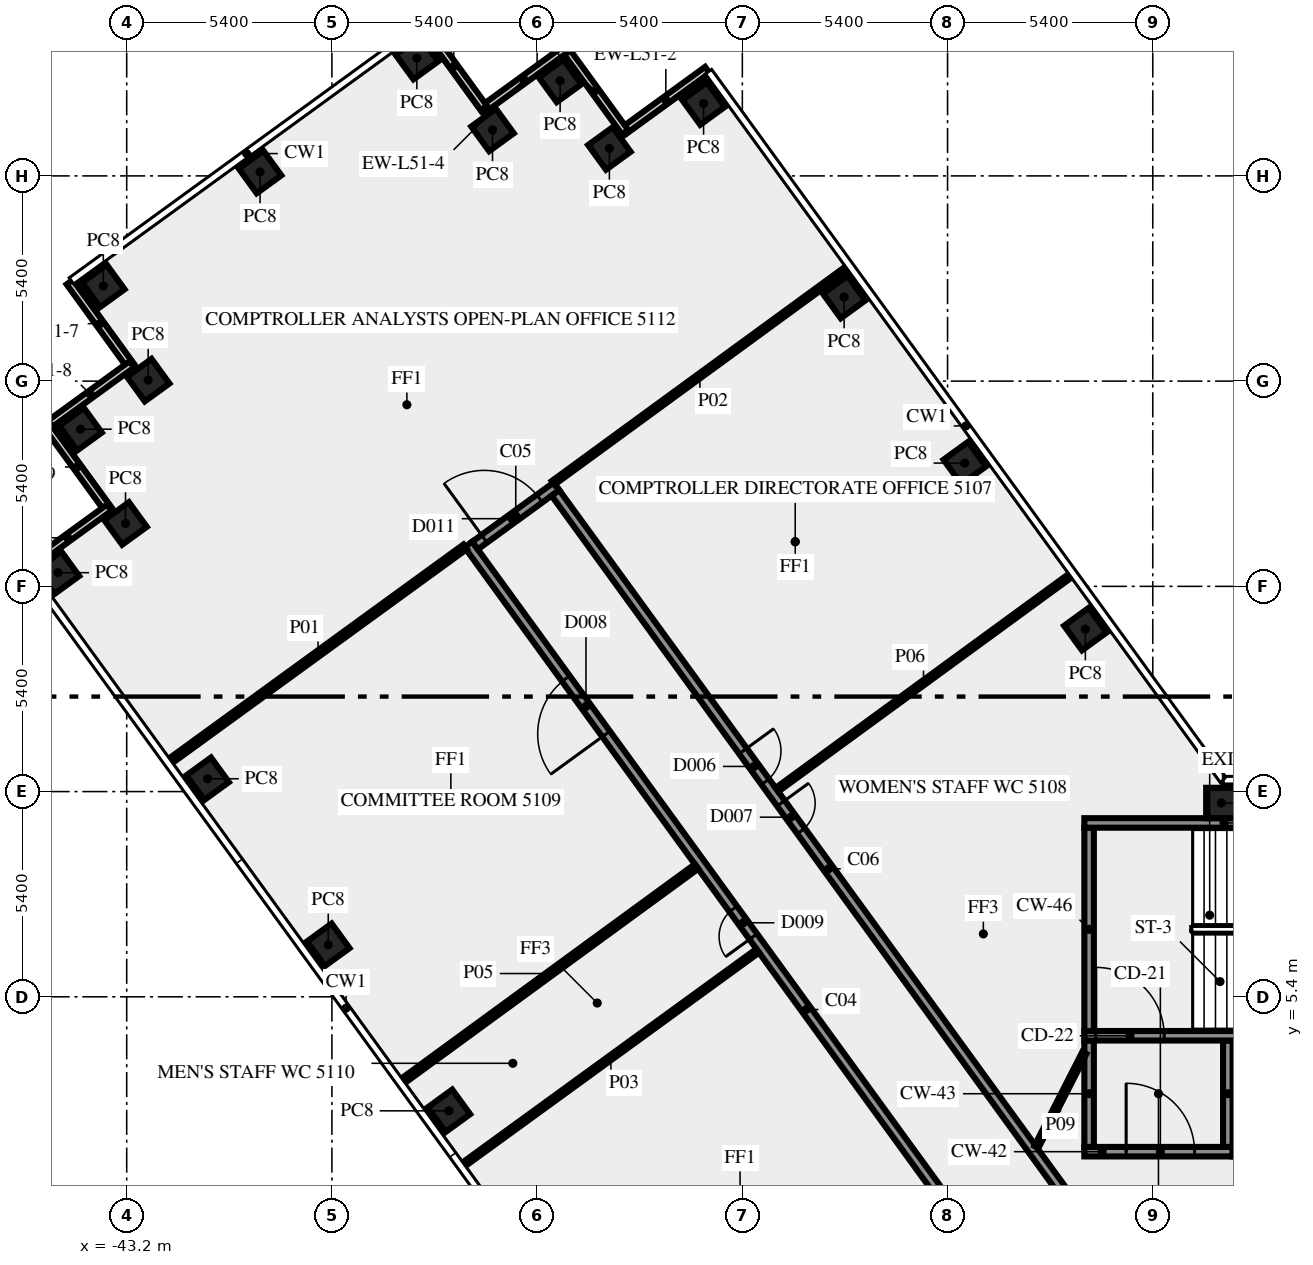
"""IFC4 building model, lengths in metres.
Left out: names, types, materials, properties, quantities, classifications, styles, units other than length and angle.
Written with IfcOpenShell. Run it as: python <this file> out.ifc"""

import sys

from ifc_helpers import new_model, si_unit, direction, frame, frame_2d, origin, origin_2d, place, context, subcontext, project, spatial, rectangle, extrude, element, fill, save


model = new_model("IFC4")
c1 = context("Model", 3, precision=1e-05, world=origin(), true_north=direction((0.0, 1.0)))
c2 = subcontext(c1, "Body", "Model", "MODEL_VIEW")
j1 = project(units=[si_unit("LENGTHUNIT", "METRE"), si_unit("PLANEANGLEUNIT", "RADIAN")], contexts=[c1])
p1 = place(None, origin())
s1 = spatial("IfcSite", under=j1, at=p1, CompositionType="ELEMENT")
p2 = place(p1, origin())
s2 = spatial("IfcBuilding", under=s1, at=p2, CompositionType="ELEMENT")
p3 = place(p2, frame((0.0, 0.0, 218.0)))
s3 = spatial("IfcBuildingStorey", under=s2, at=p3, CompositionType="ELEMENT", Elevation=218.0)
for number, where, z_axis, x_axis in (
    (1, (-17.974, 15.075, 0.0), (0.0, 0.0, 1.0), (-0.588, 0.809, 0.0)),
    (2, (-21.147, 19.444, 0.0), (0.0, 0.0, 1.0), (-0.588, 0.809, 0.0)),
    (3, (-24.321, 23.812, 0.0), (0.0, 0.0, 1.0), (-0.588, 0.809, 0.0)),
    (4, (-28.02, 28.905, 0.0), (0.0, 0.0, 1.0), (-0.809, -0.588, 0.0)),
    (5, (-30.499, 27.723, 0.0), (0.0, 0.0, 1.0), (-0.809, -0.588, 0.0)),
    (6, (-31.795, 29.5, 0.0), (0.0, 0.0, 1.0), (-0.588, 0.809, 0.0)),
    (7, (-33.574, 28.209, 0.0), (0.0, 0.0, 1.0), (-0.588, 0.809, 0.0)),
    (8, (-35.565, 30.1, 0.0), (0.0, 0.0, 1.0), (-0.809, -0.588, 0.0)),
    (9, (-39.691, 27.102, 0.0), (0.0, 0.0, 1.0), (-0.809, -0.588, 0.0)),
    (10, (-43.815, 24.105, 0.0), (0.0, 0.0, 1.0), (-0.809, -0.588, 0.0)),
    (11, (-42.635, 21.626, 0.0), (0.0, 0.0, 1.0), (-0.809, -0.588, 0.0)),
    (12, (-44.415, 20.335, 0.0), (0.0, 0.0, 1.0), (0.588, -0.809, 0.0)),
    (13, (-43.231, 17.854, 0.0), (0.0, 0.0, 1.0), (0.588, -0.809, 0.0)),
    (14, (-45.01, 16.56, 0.0), (0.0, 0.0, 1.0), (0.588, -0.809, 0.0)),
    (15, (-41.07, 11.137, 0.0), (0.0, 0.0, 1.0), (0.588, -0.809, 0.0)),
    (16, (-37.896, 6.769, 0.0), (0.0, 0.0, 1.0), (0.588, -0.809, 0.0)),
    (17, (-34.722, 2.4, 0.0), (0.0, 0.0, 1.0), (0.588, -0.809, 0.0)),
    (18, (-14.395, 10.5, 0.0), (0.0, 0.0, 1.0), (-1.0, 0.0, 0.0)),
):
    element("IfcColumn", number, at=place(p3, frame(where, z_axis=z_axis, x_axis=x_axis)), inside=s3, PredefinedType="COLUMN", context=c2, shape_type="SweptSolid", body=[
        extrude(rectangle(XDim=0.8, YDim=0.8, at=origin_2d()), origin(), (0.0, 0.0, 1.0), 3.65),
    ])
for number, where, z_axis, x_axis in (
    (19, (-27.921, 29.787, 0.0), (0.0, 0.0, 1.0), (-0.809, -0.588, 0.0)),
    (20, (-30.083, 28.149, 0.0), (0.0, 0.0, 1.0), (-0.588, 0.809, 0.0)),
    (21, (-31.654, 30.331, 0.0), (0.0, 0.0, 1.0), (-0.809, -0.588, 0.0)),
    (22, (-33.801, 28.786, 0.0), (0.0, 0.0, 1.0), (-0.588, 0.809, 0.0)),
    (23, (-44.699, 24.205, 0.0), (0.0, 0.0, 1.0), (0.588, -0.809, 0.0)),
    (24, (-43.061, 22.043, 0.0), (0.0, 0.0, 1.0), (-0.809, -0.588, 0.0)),
    (25, (-45.296, 20.434, 0.0), (0.0, 0.0, 1.0), (0.588, -0.809, 0.0)),
    (26, (-43.658, 18.272, 0.0), (0.0, 0.0, 1.0), (-0.809, -0.588, 0.0)),
):
    element("IfcWall", number, at=place(p3, frame(where, z_axis=z_axis, x_axis=x_axis)), inside=s3, PredefinedType="SOLIDWALL", context=c2, shape_type="SweptSolid", body=[
        extrude(rectangle(XDim=2.7, YDim=0.2, at=frame_2d((1.35, 0.0))), origin(), (0.0, 0.0, 1.0), 3.65),
    ])
p4 = place(p3, frame((-18.0, 1.325, 0.0), z_axis=(0.0, 0.0, 1.0), x_axis=(1.0, 0.0, 0.0)))
e27 = element("IfcWall", 27, at=p4, inside=s3, PredefinedType="SHEAR", context=c2, shape_type="SweptSolid", body=[
    extrude(rectangle(XDim=3.9, YDim=0.25, at=frame_2d((1.95, 0.0))), origin(), (0.0, 0.0, 1.0), 3.65),
])
p5 = place(p4, frame((1.1, 0.0, 0.0)))
e28 = element("IfcOpeningElement", 28, at=p5, cuts=e27, PredefinedType="OPENING", context=c2, shape_type="SweptSolid", body=[
    extrude(rectangle(XDim=1.8, YDim=2.1, at=frame_2d((0.9, 1.05))), frame((0.0, 0.135, 0.0), z_axis=(0.0, -1.0, 0.0), x_axis=(1.0, 0.0, 0.0)), (0.0, 0.0, 1.0), 0.27),
])
for number, where, z_axis, x_axis in (
    (29, (-17.875, 1.45, 0.0), (0.0, 0.0, 1.0), (0.0, 1.0, 0.0)),
    (30, (-14.225, 1.45, 0.0), (0.0, 0.0, 1.0), (0.0, 1.0, 0.0)),
):
    element("IfcWall", number, at=place(p3, frame(where, z_axis=z_axis, x_axis=x_axis)), inside=s3, PredefinedType="SHEAR", context=c2, shape_type="SweptSolid", body=[
        extrude(rectangle(XDim=2.8, YDim=0.25, at=frame_2d((1.4, 0.0))), origin(), (0.0, 0.0, 1.0), 3.65),
    ])
p6 = place(p3, frame((-18.0, 4.375, 0.0), z_axis=(0.0, 0.0, 1.0), x_axis=(1.0, 0.0, 0.0)))
e31 = element("IfcWall", 31, at=p6, inside=s3, PredefinedType="SHEAR", context=c2, shape_type="SweptSolid", body=[
    extrude(rectangle(XDim=10.5, YDim=0.25, at=frame_2d((5.25, 0.0))), origin(), (0.0, 0.0, 1.0), 3.65),
])
p7 = place(p6, frame((0.3, 0.0, 0.0)))
e32 = element("IfcOpeningElement", 32, at=p7, cuts=e31, PredefinedType="OPENING", context=c2, shape_type="SweptSolid", body=[
    extrude(rectangle(XDim=1.8, YDim=2.1, at=frame_2d((0.9, 1.05))), frame((0.0, 0.135, 0.0), z_axis=(0.0, -1.0, 0.0), x_axis=(1.0, 0.0, 0.0)), (0.0, 0.0, 1.0), 0.27),
])
p8 = place(p3, frame((-17.875, 4.5, 0.0), z_axis=(0.0, 0.0, 1.0), x_axis=(0.0, 1.0, 0.0)))
e33 = element("IfcWall", 33, at=p8, inside=s3, PredefinedType="SHEAR", context=c2, shape_type="SweptSolid", body=[
    extrude(rectangle(XDim=5.35, YDim=0.25, at=frame_2d((2.675, 0.0))), origin(), (0.0, 0.0, 1.0), 3.65),
])
p9 = place(p3, frame((-18.0, 9.975, 0.0), z_axis=(0.0, 0.0, 1.0), x_axis=(1.0, 0.0, 0.0)))
e34 = element("IfcWall", 34, at=p9, inside=s3, PredefinedType="SHEAR", context=c2, shape_type="SweptSolid", body=[
    extrude(rectangle(XDim=10.5, YDim=0.25, at=frame_2d((5.25, 0.0))), origin(), (0.0, 0.0, 1.0), 3.65),
])
p10 = place(p9, frame((4.5, 0.0, 1.0)))
e35 = element("IfcOpeningElement", 35, at=p10, cuts=e34, PredefinedType="OPENING", context=c2, shape_type="SweptSolid", body=[
    extrude(rectangle(XDim=1.2, YDim=1.2, at=frame_2d((0.6, 0.6))), frame((0.0, 0.135, 0.0), z_axis=(0.0, -1.0, 0.0), x_axis=(1.0, 0.0, 0.0)), (0.0, 0.0, 1.0), 0.27),
])
p11 = place(p3, frame((-20.531, -1.523, 0.0), z_axis=(0.0, 0.0, 1.0), x_axis=(-0.587784239999, 0.809017729849, 0.0)))
e36 = element("IfcWall", 36, at=p11, inside=s3, PredefinedType="SOLIDWALL", context=c2, shape_type="SweptSolid", body=[
    extrude(rectangle(XDim=23.271, YDim=0.25, at=frame_2d((11.635, 0.0))), origin(), (0.0, 0.0, 1.0), 3.65),
])
p12 = place(p11, frame((0.533, 0.0, 0.0)))
e37 = element("IfcOpeningElement", 37, at=p12, cuts=e36, PredefinedType="OPENING", context=c2, shape_type="SweptSolid", body=[
    extrude(rectangle(XDim=0.9, YDim=2.1, at=frame_2d((0.45, 1.05))), frame((0.0, 0.135, 0.0), z_axis=(0.0, -1.0, 0.0), x_axis=(1.0, 0.0, 0.0)), (0.0, 0.0, 1.0), 0.27),
])
p13 = place(p11, frame((17.106, 0.0, 0.0)))
e38 = element("IfcOpeningElement", 38, at=p13, cuts=e36, PredefinedType="OPENING", context=c2, shape_type="SweptSolid", body=[
    extrude(rectangle(XDim=1.8, YDim=2.1, at=frame_2d((0.9, 1.05))), frame((0.0, 0.135, 0.0), z_axis=(0.0, -1.0, 0.0), x_axis=(1.0, 0.0, 0.0)), (0.0, 0.0, 1.0), 0.27),
])
p14 = place(p11, frame((10.516, 0.0, 0.0)))
e39 = element("IfcOpeningElement", 39, at=p14, cuts=e36, PredefinedType="OPENING", context=c2, shape_type="SweptSolid", body=[
    extrude(rectangle(XDim=0.9, YDim=2.1, at=frame_2d((0.45, 1.05))), frame((0.0, 0.135, 0.0), z_axis=(0.0, -1.0, 0.0), x_axis=(1.0, 0.0, 0.0)), (0.0, 0.0, 1.0), 0.27),
])
p15 = place(p3, frame((-34.034, 17.275, 0.0), z_axis=(0.0, 0.0, 1.0), x_axis=(0.809006914995, 0.587799125119, 0.0)))
e40 = element("IfcWall", 40, at=p15, inside=s3, PredefinedType="SOLIDWALL", context=c2, shape_type="SweptSolid", body=[
    extrude(rectangle(XDim=2.65, YDim=0.25, at=frame_2d((1.325, 0.0))), origin(), (0.0, 0.0, 1.0), 3.65),
])
p16 = place(p15, frame((0.3, 0.0, 0.0)))
e41 = element("IfcOpeningElement", 41, at=p16, cuts=e40, PredefinedType="OPENING", context=c2, shape_type="SweptSolid", body=[
    extrude(rectangle(XDim=1.8, YDim=2.1, at=frame_2d((0.9, 1.05))), frame((0.0, 0.135, 0.0), z_axis=(0.0, -1.0, 0.0), x_axis=(1.0, 0.0, 0.0)), (0.0, 0.0, 1.0), 0.27),
])
p17 = place(p3, frame((-31.918, 18.658, 0.0), z_axis=(0.0, 0.0, 1.0), x_axis=(0.587788731405, -0.80901446664, 0.0)))
e42 = element("IfcWall", 42, at=p17, inside=s3, PredefinedType="SOLIDWALL", context=c2, shape_type="SweptSolid", body=[
    extrude(rectangle(XDim=24.453, YDim=0.25, at=frame_2d((12.227, 0.0))), origin(), (0.0, 0.0, 1.0), 3.65),
])
p18 = place(p17, frame((8.395, 0.0, 0.0)))
e43 = element("IfcOpeningElement", 43, at=p18, cuts=e42, PredefinedType="OPENING", context=c2, shape_type="SweptSolid", body=[
    extrude(rectangle(XDim=1.0, YDim=2.1, at=frame_2d((0.5, 1.05))), frame((0.0, 0.135, 0.0), z_axis=(0.0, -1.0, 0.0), x_axis=(1.0, 0.0, 0.0)), (0.0, 0.0, 1.0), 0.27),
])
p19 = place(p17, frame((10.095, 0.0, 0.0)))
e44 = element("IfcOpeningElement", 44, at=p19, cuts=e42, PredefinedType="OPENING", context=c2, shape_type="SweptSolid", body=[
    extrude(rectangle(XDim=0.9, YDim=2.1, at=frame_2d((0.45, 1.05))), frame((0.0, 0.135, 0.0), z_axis=(0.0, -1.0, 0.0), x_axis=(1.0, 0.0, 0.0)), (0.0, 0.0, 1.0), 0.27),
])
p20 = place(p3, frame((-42.036, 11.615, 0.0), z_axis=(0.0, 0.0, 1.0), x_axis=(0.808985331811, 0.587828829605, 0.0)))
e45 = element("IfcWall", 45, at=p20, inside=s3, PredefinedType="PARTITIONING", context=c2, shape_type="SweptSolid", body=[
    extrude(rectangle(XDim=9.57, YDim=0.15, at=frame_2d((4.785, 0.0))), origin(), (0.0, 0.0, 1.0), 2.85),
])
p21 = place(p3, frame((-31.98, 18.922, 0.0), z_axis=(0.0, 0.0, 1.0), x_axis=(0.807588329082, 0.589746632657, 0.0)))
e46 = element("IfcWall", 46, at=p21, inside=s3, PredefinedType="PARTITIONING", context=c2, shape_type="SweptSolid", body=[
    extrude(rectangle(XDim=9.57, YDim=0.12, at=frame_2d((4.785, 0.0))), origin(), (0.0, 0.0, 1.0), 2.85),
])
p22 = place(p3, frame((-26.595, 6.611, 0.0), z_axis=(0.0, 0.0, 1.0), x_axis=(-0.80900684162, -0.587799226107, 0.0)))
e47 = element("IfcWall", 47, at=p22, inside=s3, PredefinedType="PARTITIONING", context=c2, shape_type="SweptSolid", body=[
    extrude(rectangle(XDim=9.55, YDim=0.12, at=frame_2d((4.775, 0.0))), origin(), (0.0, 0.0, 1.0), 2.85),
])
p23 = place(p3, frame((-35.919, 3.197, 0.0), z_axis=(0.0, 0.0, 1.0), x_axis=(0.807645841498, 0.589667868135, 0.0)))
e48 = element("IfcWall", 48, at=p23, inside=s3, PredefinedType="PARTITIONING", context=c2, shape_type="SweptSolid", body=[
    extrude(rectangle(XDim=9.551, YDim=0.15, at=frame_2d((4.775, 0.0))), origin(), (0.0, 0.0, 1.0), 2.85),
])
p24 = place(p3, frame((-26.089, 10.848, 0.0), z_axis=(0.0, 0.0, 1.0), x_axis=(0.807661302092, 0.589646691759, 0.0)))
e49 = element("IfcWall", 49, at=p24, inside=s3, PredefinedType="PARTITIONING", context=c2, shape_type="SweptSolid", body=[
    extrude(rectangle(XDim=9.55, YDim=0.12, at=frame_2d((4.775, 0.0))), origin(), (0.0, 0.0, 1.0), 2.85),
])
p25 = place(p3, frame((-19.261, 1.45, 0.0), z_axis=(0.0, 0.0, 1.0), x_axis=(0.453950796792, 0.891026752736, 0.0)))
e50 = element("IfcWall", 50, at=p25, inside=s3, PredefinedType="PARTITIONING", context=c2, shape_type="SweptSolid", body=[
    extrude(rectangle(XDim=2.778, YDim=0.12, at=frame_2d((1.389, 0.0))), origin(), (0.0, 0.0, 1.0), 3.65),
])
p26 = place(p5, origin())
e51 = element("IfcDoor", 51, at=p26, inside=s3, OperationType="DOUBLE_DOOR_SINGLE_SWING", PredefinedType="DOOR", context=c2, shape_type="SweptSolid", body=[
    extrude(rectangle(XDim=1.8, YDim=2.1, at=frame_2d((0.9, 1.05))), frame((0.0, 0.025, 0.0), z_axis=(0.0, -1.0, 0.0), x_axis=(1.0, 0.0, 0.0)), (0.0, 0.0, 1.0), 0.05),
])
fill(e28, e51)
p27 = place(p7, origin())
e52 = element("IfcDoor", 52, at=p27, inside=s3, OperationType="DOUBLE_DOOR_SINGLE_SWING", PredefinedType="DOOR", context=c2, shape_type="SweptSolid", body=[
    extrude(rectangle(XDim=1.8, YDim=2.1, at=frame_2d((0.9, 1.05))), frame((0.0, 0.025, 0.0), z_axis=(0.0, -1.0, 0.0), x_axis=(1.0, 0.0, 0.0)), (0.0, 0.0, 1.0), 0.05),
])
fill(e32, e52)
p28 = place(p16, origin())
e53 = element("IfcDoor", 53, at=p28, inside=s3, OperationType="DOUBLE_DOOR_SINGLE_SWING", PredefinedType="DOOR", context=c2, shape_type="SweptSolid", body=[
    extrude(rectangle(XDim=1.8, YDim=2.1, at=frame_2d((0.9, 1.05))), frame((0.0, 0.025, 0.0), z_axis=(0.0, -1.0, 0.0), x_axis=(1.0, 0.0, 0.0)), (0.0, 0.0, 1.0), 0.05),
])
fill(e41, e53)
p29 = place(p13, origin())
e54 = element("IfcDoor", 54, at=p29, inside=s3, OperationType="DOUBLE_DOOR_SINGLE_SWING", PredefinedType="DOOR", context=c2, shape_type="SweptSolid", body=[
    extrude(rectangle(XDim=1.8, YDim=2.1, at=frame_2d((0.9, 1.05))), frame((0.0, 0.025, 0.0), z_axis=(0.0, -1.0, 0.0), x_axis=(1.0, 0.0, 0.0)), (0.0, 0.0, 1.0), 0.05),
])
fill(e38, e54)
p30 = place(p18, origin())
e55 = element("IfcDoor", 55, at=p30, inside=s3, OperationType="SINGLE_SWING_RIGHT", PredefinedType="DOOR", context=c2, shape_type="SweptSolid", body=[
    extrude(rectangle(XDim=1.0, YDim=2.1, at=frame_2d((0.5, 1.05))), frame((0.0, 0.025, 0.0), z_axis=(0.0, -1.0, 0.0), x_axis=(1.0, 0.0, 0.0)), (0.0, 0.0, 1.0), 0.05),
])
fill(e43, e55)
p31 = place(p19, origin())
e56 = element("IfcDoor", 56, at=p31, inside=s3, OperationType="SINGLE_SWING_LEFT", PredefinedType="DOOR", context=c2, shape_type="SweptSolid", body=[
    extrude(rectangle(XDim=0.9, YDim=2.1, at=frame_2d((0.45, 1.05))), frame((0.0, 0.025, 0.0), z_axis=(0.0, -1.0, 0.0), x_axis=(1.0, 0.0, 0.0)), (0.0, 0.0, 1.0), 0.05),
])
fill(e44, e56)
p32 = place(p14, origin())
e57 = element("IfcDoor", 57, at=p32, inside=s3, OperationType="SINGLE_SWING_LEFT", PredefinedType="DOOR", context=c2, shape_type="SweptSolid", body=[
    extrude(rectangle(XDim=0.9, YDim=2.1, at=frame_2d((0.45, 1.05))), frame((0.0, 0.025, 0.0), z_axis=(0.0, -1.0, 0.0), x_axis=(1.0, 0.0, 0.0)), (0.0, 0.0, 1.0), 0.05),
])
fill(e39, e57)
save(model, sys.argv[1])
